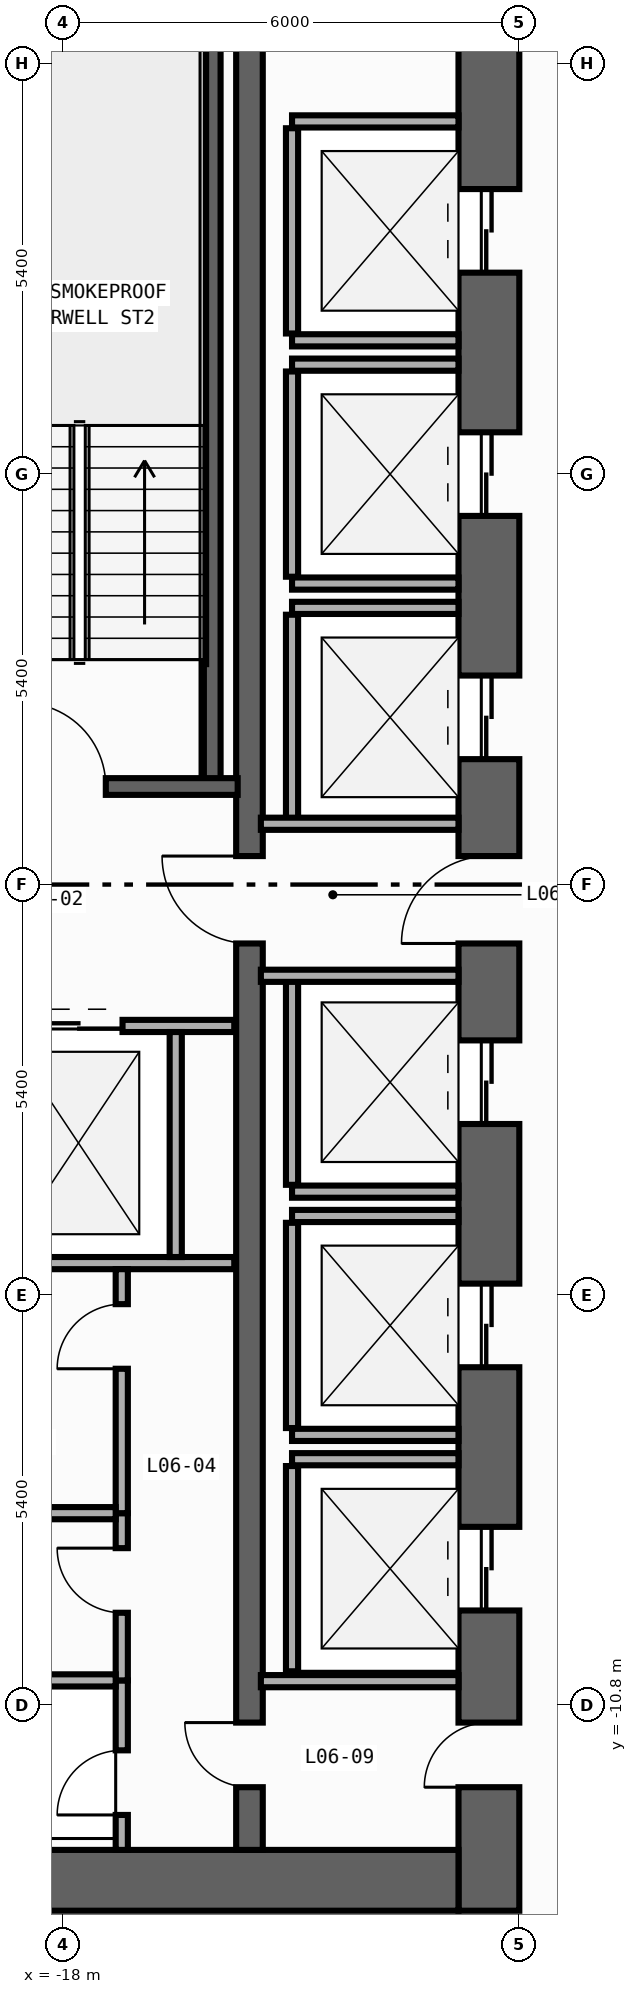
"""IFC4 building model, lengths in metres.
Left out: names, types, materials, properties, quantities, classifications, styles, units other than length and angle.
Written with IfcOpenShell. Run it as: python <this file> out.ifc"""

import sys

from ifc_helpers import new_model, si_unit, direction, frame, frame_2d, origin, place, context, subcontext, project, spatial, rectangle, extrude, element, fill, save


model = new_model("IFC4")
c1 = context("Model", 3, precision=1e-05, world=origin(), true_north=direction((0.0, 1.0)))
c2 = subcontext(c1, "Body", "Model", "MODEL_VIEW")
j1 = project(units=[si_unit("LENGTHUNIT", "METRE"), si_unit("PLANEANGLEUNIT", "RADIAN")], contexts=[c1])
p1 = place(None, origin())
s1 = spatial("IfcSite", under=j1, at=p1, CompositionType="ELEMENT")
p2 = place(p1, origin())
s2 = spatial("IfcBuilding", under=s1, at=p2, CompositionType="ELEMENT")
p3 = place(p2, frame((0.0, 0.0, 26.0)))
s3 = spatial("IfcBuildingStorey", under=s2, at=p3, CompositionType="ELEMENT", Elevation=26.0)
p4 = place(p3, frame((-12.4, -13.5, 0.0), z_axis=(0.0, 0.0, 1.0), x_axis=(0.0, 1.0, 0.0)))
e1 = element("IfcWall", 1, at=p4, inside=s3, PredefinedType="SHEAR", context=c2, shape_type="SweptSolid", body=[
    extrude(rectangle(XDim=27.0, YDim=0.8, at=frame_2d((13.5, 0.0))), origin(), (0.0, 0.0, 1.0), 3.94),
])
p5 = place(p4, frame((21.55, 0.0, 0.0)))
e2 = element("IfcOpeningElement", 2, at=p5, cuts=e1, PredefinedType="OPENING", context=c2, shape_type="SweptSolid", body=[
    extrude(rectangle(XDim=1.1, YDim=2.2, at=frame_2d((0.55, 1.1))), frame((0.0, 0.41, 0.0), z_axis=(0.0, -1.0, 0.0), x_axis=(1.0, 0.0, 0.0)), (0.0, 0.0, 1.0), 0.82),
])
p6 = place(p4, frame((18.35, 0.0, 0.0)))
e3 = element("IfcOpeningElement", 3, at=p6, cuts=e1, PredefinedType="OPENING", context=c2, shape_type="SweptSolid", body=[
    extrude(rectangle(XDim=1.1, YDim=2.2, at=frame_2d((0.55, 1.1))), frame((0.0, 0.41, 0.0), z_axis=(0.0, -1.0, 0.0), x_axis=(1.0, 0.0, 0.0)), (0.0, 0.0, 1.0), 0.82),
])
p7 = place(p4, frame((15.15, 0.0, 0.0)))
e4 = element("IfcOpeningElement", 4, at=p7, cuts=e1, PredefinedType="OPENING", context=c2, shape_type="SweptSolid", body=[
    extrude(rectangle(XDim=1.1, YDim=2.2, at=frame_2d((0.55, 1.1))), frame((0.0, 0.41, 0.0), z_axis=(0.0, -1.0, 0.0), x_axis=(1.0, 0.0, 0.0)), (0.0, 0.0, 1.0), 0.82),
])
p8 = place(p4, frame((10.35, 0.0, 0.0)))
e5 = element("IfcOpeningElement", 5, at=p8, cuts=e1, PredefinedType="OPENING", context=c2, shape_type="SweptSolid", body=[
    extrude(rectangle(XDim=1.1, YDim=2.2, at=frame_2d((0.55, 1.1))), frame((0.0, 0.41, 0.0), z_axis=(0.0, -1.0, 0.0), x_axis=(1.0, 0.0, 0.0)), (0.0, 0.0, 1.0), 0.82),
])
p9 = place(p4, frame((7.15, 0.0, 0.0)))
e6 = element("IfcOpeningElement", 6, at=p9, cuts=e1, PredefinedType="OPENING", context=c2, shape_type="SweptSolid", body=[
    extrude(rectangle(XDim=1.1, YDim=2.2, at=frame_2d((0.55, 1.1))), frame((0.0, 0.41, 0.0), z_axis=(0.0, -1.0, 0.0), x_axis=(1.0, 0.0, 0.0)), (0.0, 0.0, 1.0), 0.82),
])
p10 = place(p4, frame((3.95, 0.0, 0.0)))
e7 = element("IfcOpeningElement", 7, at=p10, cuts=e1, PredefinedType="OPENING", context=c2, shape_type="SweptSolid", body=[
    extrude(rectangle(XDim=1.1, YDim=2.2, at=frame_2d((0.55, 1.1))), frame((0.0, 0.41, 0.0), z_axis=(0.0, -1.0, 0.0), x_axis=(1.0, 0.0, 0.0)), (0.0, 0.0, 1.0), 0.82),
])
p11 = place(p4, frame((12.725, 0.0, 0.0)))
e8 = element("IfcOpeningElement", 8, at=p11, cuts=e1, PredefinedType="OPENING", context=c2, shape_type="SweptSolid", body=[
    extrude(rectangle(XDim=1.15, YDim=2.2, at=frame_2d((0.575, 1.1))), frame((0.0, 0.41, 0.0), z_axis=(0.0, -1.0, 0.0), x_axis=(1.0, 0.0, 0.0)), (0.0, 0.0, 1.0), 0.82),
])
p12 = place(p4, frame((1.625, 0.0, 0.0)))
e9 = element("IfcOpeningElement", 9, at=p12, cuts=e1, PredefinedType="OPENING", context=c2, shape_type="SweptSolid", body=[
    extrude(rectangle(XDim=0.85, YDim=2.1, at=frame_2d((0.425, 1.05))), frame((0.0, 0.41, 0.0), z_axis=(0.0, -1.0, 0.0), x_axis=(1.0, 0.0, 0.0)), (0.0, 0.0, 1.0), 0.82),
])
p13 = place(p3, frame((-19.6, -13.1, 0.0), z_axis=(0.0, 0.0, 1.0), x_axis=(1.0, 0.0, 0.0)))
e10 = element("IfcWall", 10, at=p13, inside=s3, PredefinedType="SHEAR", context=c2, shape_type="SweptSolid", body=[
    extrude(rectangle(XDim=6.8, YDim=0.8, at=frame_2d((3.4, 0.0))), origin(), (0.0, 0.0, 1.0), 3.94),
])
p14 = place(p3, frame((-15.55, -12.7, 0.0), z_axis=(0.0, 0.0, 1.0), x_axis=(0.0, 1.0, 0.0)))
e11 = element("IfcWall", 11, at=p14, inside=s3, PredefinedType="SHEAR", context=c2, shape_type="SweptSolid", body=[
    extrude(rectangle(XDim=25.4, YDim=0.35, at=frame_2d((12.7, 0.0))), origin(), (0.0, 0.0, 1.0), 3.94),
])
p15 = place(p14, frame((11.925, 0.0, 0.0)))
e12 = element("IfcOpeningElement", 12, at=p15, cuts=e11, PredefinedType="OPENING", context=c2, shape_type="SweptSolid", body=[
    extrude(rectangle(XDim=1.15, YDim=2.2, at=frame_2d((0.575, 1.1))), frame((0.0, 0.185, 0.0), z_axis=(0.0, -1.0, 0.0), x_axis=(1.0, 0.0, 0.0)), (0.0, 0.0, 1.0), 0.37),
])
p16 = place(p14, frame((0.825, 0.0, 0.0)))
e13 = element("IfcOpeningElement", 13, at=p16, cuts=e11, PredefinedType="OPENING", context=c2, shape_type="SweptSolid", body=[
    extrude(rectangle(XDim=0.85, YDim=2.1, at=frame_2d((0.425, 1.05))), frame((0.0, 0.185, 0.0), z_axis=(0.0, -1.0, 0.0), x_axis=(1.0, 0.0, 0.0)), (0.0, 0.0, 1.0), 0.37),
])
p17 = place(p3, frame((-16.04, 1.29, 0.0), z_axis=(0.0, 0.0, 1.0), x_axis=(0.0, 1.0, 0.0)))
e14 = element("IfcWall", 14, at=p17, inside=s3, PredefinedType="SHEAR", context=c2, shape_type="SweptSolid", body=[
    extrude(rectangle(XDim=11.3, YDim=0.22, at=frame_2d((5.65, 0.0))), origin(), (0.0, 0.0, 1.0), 3.94),
])
p18 = place(p3, frame((-19.62, 1.29, 0.0), z_axis=(0.0, 0.0, 1.0), x_axis=(1.0, 0.0, 0.0)))
e15 = element("IfcWall", 15, at=p18, inside=s3, PredefinedType="SHEAR", context=c2, shape_type="SweptSolid", body=[
    extrude(rectangle(XDim=3.915, YDim=0.22, at=frame_2d((1.958, 0.0))), origin(), (0.0, 0.0, 1.0), 3.94),
])
p19 = place(p18, frame((1.08, 0.0, 0.0)))
e16 = element("IfcOpeningElement", 16, at=p19, cuts=e15, PredefinedType="OPENING", context=c2, shape_type="SweptSolid", body=[
    extrude(rectangle(XDim=1.1, YDim=2.2, at=frame_2d((0.55, 1.1))), frame((0.0, 0.12, 0.0), z_axis=(0.0, -1.0, 0.0), x_axis=(1.0, 0.0, 0.0)), (0.0, 0.0, 1.0), 0.24),
])
for number, where, z_axis, x_axis in (
    (17, (-14.99, 7.16, 0.0), (0.0, 0.0, 1.0), (1.0, 0.0, 0.0)),
    (18, (-14.99, 10.04, 0.0), (0.0, 0.0, 1.0), (1.0, 0.0, 0.0)),
):
    element("IfcWall", number, at=place(p3, frame(where, z_axis=z_axis, x_axis=x_axis)), inside=s3, PredefinedType="STANDARD", context=c2, shape_type="SweptSolid", body=[
        extrude(rectangle(XDim=2.19, YDim=0.16, at=frame_2d((1.095, 0.0))), origin(), (0.0, 0.0, 1.0), 3.94),
    ])
p20 = place(p3, frame((-14.99, 7.25, 0.0), z_axis=(0.0, 0.0, 1.0), x_axis=(0.0, 1.0, 0.0)))
e19 = element("IfcWall", 19, at=p20, inside=s3, PredefinedType="STANDARD", context=c2, shape_type="SweptSolid", body=[
    extrude(rectangle(XDim=2.7, YDim=0.16, at=frame_2d((1.35, 0.0))), origin(), (0.0, 0.0, 1.0), 3.94),
])
for number, where, z_axis, x_axis in (
    (20, (-14.99, 3.96, 0.0), (0.0, 0.0, 1.0), (1.0, 0.0, 0.0)),
    (21, (-14.99, 6.84, 0.0), (0.0, 0.0, 1.0), (1.0, 0.0, 0.0)),
):
    element("IfcWall", number, at=place(p3, frame(where, z_axis=z_axis, x_axis=x_axis)), inside=s3, PredefinedType="STANDARD", context=c2, shape_type="SweptSolid", body=[
        extrude(rectangle(XDim=2.19, YDim=0.16, at=frame_2d((1.095, 0.0))), origin(), (0.0, 0.0, 1.0), 3.94),
    ])
p21 = place(p3, frame((-14.99, 4.05, 0.0), z_axis=(0.0, 0.0, 1.0), x_axis=(0.0, 1.0, 0.0)))
e22 = element("IfcWall", 22, at=p21, inside=s3, PredefinedType="STANDARD", context=c2, shape_type="SweptSolid", body=[
    extrude(rectangle(XDim=2.7, YDim=0.16, at=frame_2d((1.35, 0.0))), origin(), (0.0, 0.0, 1.0), 3.94),
])
p22 = place(p3, frame((-14.99, 3.64, 0.0), z_axis=(0.0, 0.0, 1.0), x_axis=(1.0, 0.0, 0.0)))
e23 = element("IfcWall", 23, at=p22, inside=s3, PredefinedType="STANDARD", context=c2, shape_type="SweptSolid", body=[
    extrude(rectangle(XDim=2.19, YDim=0.16, at=frame_2d((1.095, 0.0))), origin(), (0.0, 0.0, 1.0), 3.94),
])
p23 = place(p3, frame((-14.99, 0.85, 0.0), z_axis=(0.0, 0.0, 1.0), x_axis=(0.0, 1.0, 0.0)))
e24 = element("IfcWall", 24, at=p23, inside=s3, PredefinedType="STANDARD", context=c2, shape_type="SweptSolid", body=[
    extrude(rectangle(XDim=2.7, YDim=0.16, at=frame_2d((1.35, 0.0))), origin(), (0.0, 0.0, 1.0), 3.94),
])
p24 = place(p3, frame((-14.99, -4.04, 0.0), z_axis=(0.0, 0.0, 1.0), x_axis=(1.0, 0.0, 0.0)))
e25 = element("IfcWall", 25, at=p24, inside=s3, PredefinedType="STANDARD", context=c2, shape_type="SweptSolid", body=[
    extrude(rectangle(XDim=2.19, YDim=0.16, at=frame_2d((1.095, 0.0))), origin(), (0.0, 0.0, 1.0), 3.94),
])
p25 = place(p3, frame((-14.99, -3.95, 0.0), z_axis=(0.0, 0.0, 1.0), x_axis=(0.0, 1.0, 0.0)))
e26 = element("IfcWall", 26, at=p25, inside=s3, PredefinedType="STANDARD", context=c2, shape_type="SweptSolid", body=[
    extrude(rectangle(XDim=2.7, YDim=0.16, at=frame_2d((1.35, 0.0))), origin(), (0.0, 0.0, 1.0), 3.94),
])
for number, where, z_axis, x_axis in (
    (27, (-14.99, -7.24, 0.0), (0.0, 0.0, 1.0), (1.0, 0.0, 0.0)),
    (28, (-14.99, -4.36, 0.0), (0.0, 0.0, 1.0), (1.0, 0.0, 0.0)),
):
    element("IfcWall", number, at=place(p3, frame(where, z_axis=z_axis, x_axis=x_axis)), inside=s3, PredefinedType="STANDARD", context=c2, shape_type="SweptSolid", body=[
        extrude(rectangle(XDim=2.19, YDim=0.16, at=frame_2d((1.095, 0.0))), origin(), (0.0, 0.0, 1.0), 3.94),
    ])
p26 = place(p3, frame((-14.99, -7.15, 0.0), z_axis=(0.0, 0.0, 1.0), x_axis=(0.0, 1.0, 0.0)))
e29 = element("IfcWall", 29, at=p26, inside=s3, PredefinedType="STANDARD", context=c2, shape_type="SweptSolid", body=[
    extrude(rectangle(XDim=2.7, YDim=0.16, at=frame_2d((1.35, 0.0))), origin(), (0.0, 0.0, 1.0), 3.94),
])
p27 = place(p3, frame((-14.99, -7.56, 0.0), z_axis=(0.0, 0.0, 1.0), x_axis=(1.0, 0.0, 0.0)))
e30 = element("IfcWall", 30, at=p27, inside=s3, PredefinedType="STANDARD", context=c2, shape_type="SweptSolid", body=[
    extrude(rectangle(XDim=2.19, YDim=0.16, at=frame_2d((1.095, 0.0))), origin(), (0.0, 0.0, 1.0), 3.94),
])
p28 = place(p3, frame((-14.99, -10.35, 0.0), z_axis=(0.0, 0.0, 1.0), x_axis=(0.0, 1.0, 0.0)))
e31 = element("IfcWall", 31, at=p28, inside=s3, PredefinedType="STANDARD", context=c2, shape_type="SweptSolid", body=[
    extrude(rectangle(XDim=2.7, YDim=0.16, at=frame_2d((1.35, 0.0))), origin(), (0.0, 0.0, 1.0), 3.94),
])
p29 = place(p3, frame((-19.55, -1.86, 0.0), z_axis=(0.0, 0.0, 1.0), x_axis=(1.0, 0.0, 0.0)))
e32 = element("IfcWall", 32, at=p29, inside=s3, PredefinedType="STANDARD", context=c2, shape_type="SweptSolid", body=[
    extrude(rectangle(XDim=3.8, YDim=0.16, at=frame_2d((1.9, 0.0))), origin(), (0.0, 0.0, 1.0), 3.94),
])
p30 = place(p29, frame((1.18, 0.0, 0.0)))
e33 = element("IfcOpeningElement", 33, at=p30, cuts=e32, PredefinedType="OPENING", context=c2, shape_type="SweptSolid", body=[
    extrude(rectangle(XDim=1.15, YDim=2.2, at=frame_2d((0.575, 1.1))), frame((0.0, 0.09, 0.0), z_axis=(0.0, -1.0, 0.0), x_axis=(1.0, 0.0, 0.0)), (0.0, 0.0, 1.0), 0.18),
])
p31 = place(p3, frame((-19.55, -4.98, 0.0), z_axis=(0.0, 0.0, 1.0), x_axis=(1.0, 0.0, 0.0)))
e34 = element("IfcWall", 34, at=p31, inside=s3, PredefinedType="STANDARD", context=c2, shape_type="SweptSolid", body=[
    extrude(rectangle(XDim=3.8, YDim=0.16, at=frame_2d((1.9, 0.0))), origin(), (0.0, 0.0, 1.0), 3.94),
])
p32 = place(p3, frame((-16.52, -4.9, 0.0), z_axis=(0.0, 0.0, 1.0), x_axis=(0.0, 1.0, 0.0)))
e35 = element("IfcWall", 35, at=p32, inside=s3, PredefinedType="STANDARD", context=c2, shape_type="SweptSolid", body=[
    extrude(rectangle(XDim=2.96, YDim=0.16, at=frame_2d((1.48, 0.0))), origin(), (0.0, 0.0, 1.0), 3.94),
])
for number, where, z_axis, x_axis in (
    (36, (-15.4, 0.8, 0.0), (0.0, 0.0, 1.0), (1.0, 0.0, 0.0)),
    (37, (-15.4, -1.2, 0.0), (0.0, 0.0, 1.0), (1.0, 0.0, 0.0)),
    (38, (-15.4, -10.48, 0.0), (0.0, 0.0, 1.0), (1.0, 0.0, 0.0)),
):
    element("IfcWall", number, at=place(p3, frame(where, z_axis=z_axis, x_axis=x_axis)), inside=s3, PredefinedType="STANDARD", context=c2, shape_type="SweptSolid", body=[
        extrude(rectangle(XDim=2.6, YDim=0.16, at=frame_2d((1.3, 0.0))), origin(), (0.0, 0.0, 1.0), 3.94),
    ])
p33 = place(p3, frame((-17.23, -12.7, 0.0), z_axis=(0.0, 0.0, 1.0), x_axis=(0.0, 1.0, 0.0)))
e39 = element("IfcWall", 39, at=p33, inside=s3, PredefinedType="PARTITIONING", context=c2, shape_type="SweptSolid", body=[
    extrude(rectangle(XDim=2.23, YDim=0.16, at=frame_2d((1.115, 0.0))), origin(), (0.0, 0.0, 1.0), 3.94),
])
p34 = place(p33, frame((0.46, 0.0, 0.0)))
e40 = element("IfcOpeningElement", 40, at=p34, cuts=e39, PredefinedType="OPENING", context=c2, shape_type="SweptSolid", body=[
    extrude(rectangle(XDim=0.85, YDim=2.1, at=frame_2d((0.425, 1.05))), frame((0.0, 0.09, 0.0), z_axis=(0.0, -1.0, 0.0), x_axis=(1.0, 0.0, 0.0)), (0.0, 0.0, 1.0), 0.18),
])
p35 = place(p3, frame((-17.23, -10.47, 0.0), z_axis=(0.0, 0.0, 1.0), x_axis=(0.0, 1.0, 0.0)))
e41 = element("IfcWall", 41, at=p35, inside=s3, PredefinedType="PARTITIONING", context=c2, shape_type="SweptSolid", body=[
    extrude(rectangle(XDim=2.2, YDim=0.16, at=frame_2d((1.1, 0.0))), origin(), (0.0, 0.0, 1.0), 3.94),
])
p36 = place(p35, frame((0.89, 0.0, 0.0)))
e42 = element("IfcOpeningElement", 42, at=p36, cuts=e41, PredefinedType="OPENING", context=c2, shape_type="SweptSolid", body=[
    extrude(rectangle(XDim=0.85, YDim=2.1, at=frame_2d((0.425, 1.05))), frame((0.0, 0.09, 0.0), z_axis=(0.0, -1.0, 0.0), x_axis=(1.0, 0.0, 0.0)), (0.0, 0.0, 1.0), 0.18),
])
p37 = place(p3, frame((-17.23, -8.27, 0.0), z_axis=(0.0, 0.0, 1.0), x_axis=(0.0, 1.0, 0.0)))
e43 = element("IfcWall", 43, at=p37, inside=s3, PredefinedType="PARTITIONING", context=c2, shape_type="SweptSolid", body=[
    extrude(rectangle(XDim=3.21, YDim=0.16, at=frame_2d((1.605, 0.0))), origin(), (0.0, 0.0, 1.0), 3.94),
])
p38 = place(p37, frame((1.9, 0.0, 0.0)))
e44 = element("IfcOpeningElement", 44, at=p38, cuts=e43, PredefinedType="OPENING", context=c2, shape_type="SweptSolid", body=[
    extrude(rectangle(XDim=0.85, YDim=2.1, at=frame_2d((0.425, 1.05))), frame((0.0, 0.09, 0.0), z_axis=(0.0, -1.0, 0.0), x_axis=(1.0, 0.0, 0.0)), (0.0, 0.0, 1.0), 0.18),
])
for number, where, z_axis, x_axis in (
    (45, (-19.6, -10.47, 0.0), (0.0, 0.0, 1.0), (1.0, 0.0, 0.0)),
    (46, (-19.6, -8.27, 0.0), (0.0, 0.0, 1.0), (1.0, 0.0, 0.0)),
):
    element("IfcWall", number, at=place(p3, frame(where, z_axis=z_axis, x_axis=x_axis)), inside=s3, PredefinedType="PARTITIONING", context=c2, shape_type="SweptSolid", body=[
        extrude(rectangle(XDim=2.29, YDim=0.16, at=frame_2d((1.145, 0.0))), origin(), (0.0, 0.0, 1.0), 3.94),
    ])
p39 = place(p19, origin())
e47 = element("IfcDoor", 47, at=p39, inside=s3, OperationType="SINGLE_SWING_LEFT", PredefinedType="DOOR", context=c2, shape_type="SweptSolid", body=[
    extrude(rectangle(XDim=1.1, YDim=2.2, at=frame_2d((0.55, 1.1))), frame((0.0, 0.025, 0.0), z_axis=(0.0, -1.0, 0.0), x_axis=(1.0, 0.0, 0.0)), (0.0, 0.0, 1.0), 0.05),
])
fill(e16, e47)
p40 = place(p5, origin())
e48 = element("IfcDoor", 48, at=p40, inside=s3, OperationType="DOUBLE_DOOR_SLIDING", PredefinedType="DOOR", context=c2, shape_type="SweptSolid", body=[
    extrude(rectangle(XDim=1.1, YDim=2.2, at=frame_2d((0.55, 1.1))), frame((0.0, 0.025, 0.0), z_axis=(0.0, -1.0, 0.0), x_axis=(1.0, 0.0, 0.0)), (0.0, 0.0, 1.0), 0.05),
])
fill(e2, e48)
p41 = place(p6, origin())
e49 = element("IfcDoor", 49, at=p41, inside=s3, OperationType="DOUBLE_DOOR_SLIDING", PredefinedType="DOOR", context=c2, shape_type="SweptSolid", body=[
    extrude(rectangle(XDim=1.1, YDim=2.2, at=frame_2d((0.55, 1.1))), frame((0.0, 0.025, 0.0), z_axis=(0.0, -1.0, 0.0), x_axis=(1.0, 0.0, 0.0)), (0.0, 0.0, 1.0), 0.05),
])
fill(e3, e49)
p42 = place(p7, origin())
e50 = element("IfcDoor", 50, at=p42, inside=s3, OperationType="DOUBLE_DOOR_SLIDING", PredefinedType="DOOR", context=c2, shape_type="SweptSolid", body=[
    extrude(rectangle(XDim=1.1, YDim=2.2, at=frame_2d((0.55, 1.1))), frame((0.0, 0.025, 0.0), z_axis=(0.0, -1.0, 0.0), x_axis=(1.0, 0.0, 0.0)), (0.0, 0.0, 1.0), 0.05),
])
fill(e4, e50)
p43 = place(p8, origin())
e51 = element("IfcDoor", 51, at=p43, inside=s3, OperationType="DOUBLE_DOOR_SLIDING", PredefinedType="DOOR", context=c2, shape_type="SweptSolid", body=[
    extrude(rectangle(XDim=1.1, YDim=2.2, at=frame_2d((0.55, 1.1))), frame((0.0, 0.025, 0.0), z_axis=(0.0, -1.0, 0.0), x_axis=(1.0, 0.0, 0.0)), (0.0, 0.0, 1.0), 0.05),
])
fill(e5, e51)
p44 = place(p9, origin())
e52 = element("IfcDoor", 52, at=p44, inside=s3, OperationType="DOUBLE_DOOR_SLIDING", PredefinedType="DOOR", context=c2, shape_type="SweptSolid", body=[
    extrude(rectangle(XDim=1.1, YDim=2.2, at=frame_2d((0.55, 1.1))), frame((0.0, 0.025, 0.0), z_axis=(0.0, -1.0, 0.0), x_axis=(1.0, 0.0, 0.0)), (0.0, 0.0, 1.0), 0.05),
])
fill(e6, e52)
p45 = place(p10, origin())
e53 = element("IfcDoor", 53, at=p45, inside=s3, OperationType="DOUBLE_DOOR_SLIDING", PredefinedType="DOOR", context=c2, shape_type="SweptSolid", body=[
    extrude(rectangle(XDim=1.1, YDim=2.2, at=frame_2d((0.55, 1.1))), frame((0.0, 0.025, 0.0), z_axis=(0.0, -1.0, 0.0), x_axis=(1.0, 0.0, 0.0)), (0.0, 0.0, 1.0), 0.05),
])
fill(e7, e53)
p46 = place(p11, origin())
e54 = element("IfcDoor", 54, at=p46, inside=s3, OperationType="SINGLE_SWING_LEFT", PredefinedType="DOOR", context=c2, shape_type="SweptSolid", body=[
    extrude(rectangle(XDim=1.15, YDim=2.2, at=frame_2d((0.575, 1.1))), frame((0.0, 0.025, 0.0), z_axis=(0.0, -1.0, 0.0), x_axis=(1.0, 0.0, 0.0)), (0.0, 0.0, 1.0), 0.05),
])
fill(e8, e54)
p47 = place(p15, origin())
e55 = element("IfcDoor", 55, at=p47, inside=s3, OperationType="SINGLE_SWING_RIGHT", PredefinedType="DOOR", context=c2, shape_type="SweptSolid", body=[
    extrude(rectangle(XDim=1.15, YDim=2.2, at=frame_2d((0.575, 1.1))), frame((0.0, 0.025, 0.0), z_axis=(0.0, -1.0, 0.0), x_axis=(1.0, 0.0, 0.0)), (0.0, 0.0, 1.0), 0.05),
])
fill(e12, e55)
p48 = place(p12, origin())
e56 = element("IfcDoor", 56, at=p48, inside=s3, OperationType="SINGLE_SWING_LEFT", PredefinedType="DOOR", context=c2, shape_type="SweptSolid", body=[
    extrude(rectangle(XDim=0.85, YDim=2.1, at=frame_2d((0.425, 1.05))), frame((0.0, 0.025, 0.0), z_axis=(0.0, -1.0, 0.0), x_axis=(1.0, 0.0, 0.0)), (0.0, 0.0, 1.0), 0.05),
])
fill(e9, e56)
p49 = place(p16, origin())
e57 = element("IfcDoor", 57, at=p49, inside=s3, OperationType="SINGLE_SWING_RIGHT", PredefinedType="DOOR", context=c2, shape_type="SweptSolid", body=[
    extrude(rectangle(XDim=0.85, YDim=2.1, at=frame_2d((0.425, 1.05))), frame((0.0, 0.025, 0.0), z_axis=(0.0, -1.0, 0.0), x_axis=(1.0, 0.0, 0.0)), (0.0, 0.0, 1.0), 0.05),
])
fill(e13, e57)
p50 = place(p30, origin())
e58 = element("IfcDoor", 58, at=p50, inside=s3, OperationType="DOUBLE_DOOR_SLIDING", PredefinedType="DOOR", context=c2, shape_type="SweptSolid", body=[
    extrude(rectangle(XDim=1.15, YDim=2.2, at=frame_2d((0.575, 1.1))), frame((0.0, 0.025, 0.0), z_axis=(0.0, -1.0, 0.0), x_axis=(1.0, 0.0, 0.0)), (0.0, 0.0, 1.0), 0.05),
])
fill(e33, e58)
p51 = place(p34, origin())
e59 = element("IfcDoor", 59, at=p51, inside=s3, OperationType="SINGLE_SWING_LEFT", PredefinedType="DOOR", context=c2, shape_type="SweptSolid", body=[
    extrude(rectangle(XDim=0.85, YDim=2.1, at=frame_2d((0.425, 1.05))), frame((0.0, 0.025, 0.0), z_axis=(0.0, -1.0, 0.0), x_axis=(1.0, 0.0, 0.0)), (0.0, 0.0, 1.0), 0.05),
])
fill(e40, e59)
p52 = place(p36, origin())
e60 = element("IfcDoor", 60, at=p52, inside=s3, OperationType="SINGLE_SWING_RIGHT", PredefinedType="DOOR", context=c2, shape_type="SweptSolid", body=[
    extrude(rectangle(XDim=0.85, YDim=2.1, at=frame_2d((0.425, 1.05))), frame((0.0, 0.025, 0.0), z_axis=(0.0, -1.0, 0.0), x_axis=(1.0, 0.0, 0.0)), (0.0, 0.0, 1.0), 0.05),
])
fill(e42, e60)
p53 = place(p38, origin())
e61 = element("IfcDoor", 61, at=p53, inside=s3, OperationType="SINGLE_SWING_LEFT", PredefinedType="DOOR", context=c2, shape_type="SweptSolid", body=[
    extrude(rectangle(XDim=0.85, YDim=2.1, at=frame_2d((0.425, 1.05))), frame((0.0, 0.025, 0.0), z_axis=(0.0, -1.0, 0.0), x_axis=(1.0, 0.0, 0.0)), (0.0, 0.0, 1.0), 0.05),
])
fill(e44, e61)
save(model, sys.argv[1])
